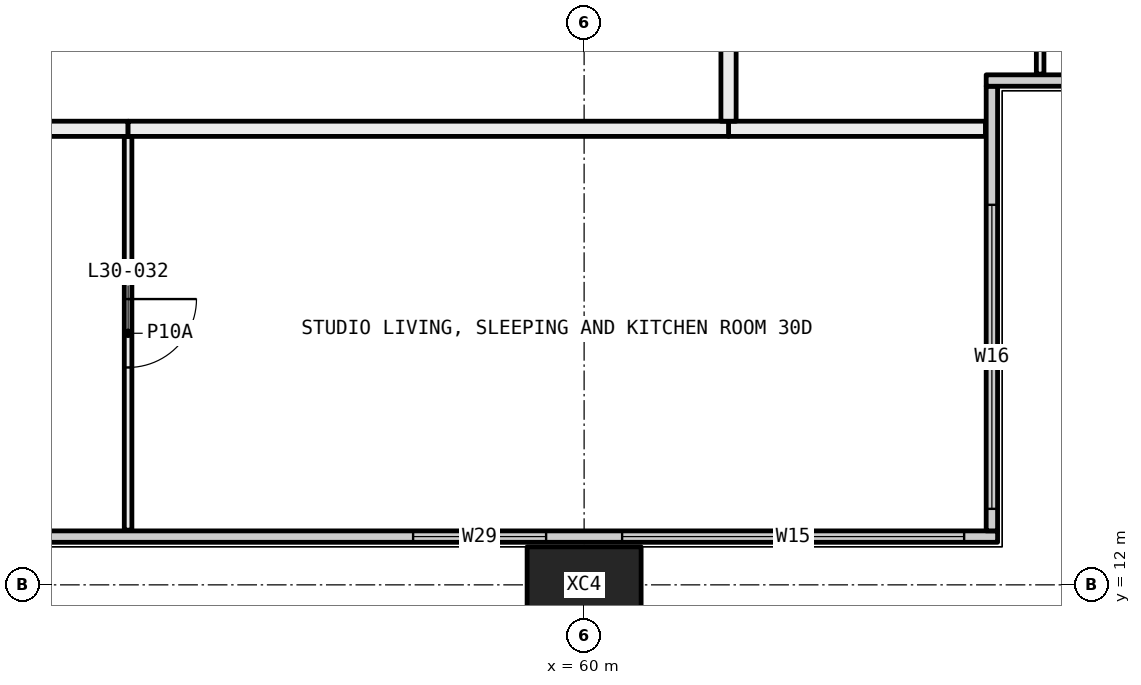
"""IFC4 building model, lengths in metres.
Left out: names, types, materials, properties, quantities, classifications, styles, units other than length and angle.
Written with IfcOpenShell. Run it as: python <this file> out.ifc"""

import sys

from ifc_helpers import new_model, si_unit, direction, frame, frame_2d, origin, origin_2d, place, context, subcontext, project, spatial, rectangle, hollow_rectangle, extrude, element, fill, save


model = new_model("IFC4")
c1 = context("Model", 3, precision=1e-05, world=origin(), true_north=direction((0.0, 1.0)))
c2 = subcontext(c1, "Body", "Model", "MODEL_VIEW")
j1 = project(units=[si_unit("LENGTHUNIT", "METRE"), si_unit("PLANEANGLEUNIT", "RADIAN")], contexts=[c1])
p1 = place(None, origin())
s1 = spatial("IfcSite", under=j1, at=p1, CompositionType="ELEMENT")
p2 = place(p1, origin())
s2 = spatial("IfcBuilding", under=s1, at=p2, CompositionType="ELEMENT")
p3 = place(p2, frame((0.0, 0.0, 117.3)))
s3 = spatial("IfcBuildingStorey", under=s2, at=p3, CompositionType="ELEMENT", Elevation=117.3)
p4 = place(p3, frame((60.0, 12.0, -0.4), z_axis=(0.0, 0.0, 1.0), x_axis=(1.0, 0.0, 0.0)))
e1 = element("IfcColumn", 1, at=p4, inside=s3, PredefinedType="COLUMN", context=c2, shape_type="SweptSolid", body=[
    extrude(hollow_rectangle(XDim=1.5, YDim=1.0, WallThickness=0.06, at=origin_2d()), origin(), (0.0, 0.0, 1.0), 3.45),
])
p5 = place(p3, frame((6.56, 12.635, 0.0), z_axis=(0.0, 0.0, 1.0), x_axis=(1.0, 0.0, 0.0)))
e2 = element("IfcWall", 2, at=p5, inside=s3, PredefinedType="ELEMENTEDWALL", context=c2, shape_type="SweptSolid", body=[
    extrude(rectangle(XDim=58.88, YDim=0.15, at=frame_2d((29.44, 0.0))), origin(), (0.0, 0.0, 1.0), 3.05),
])
p6 = place(p5, frame((0.44, 0.0, 0.45)))
e3 = element("IfcOpeningElement", 3, at=p6, cuts=e2, PredefinedType="OPENING", context=c2, shape_type="SweptSolid", body=[
    extrude(rectangle(XDim=4.5, YDim=2.55, at=frame_2d((2.25, 1.275))), frame((0.0, 0.085, 0.0), z_axis=(0.0, -1.0, 0.0), x_axis=(1.0, 0.0, 0.0)), (0.0, 0.0, 1.0), 0.17),
])
p7 = place(p5, frame((5.94, 0.0, 0.45)))
e4 = element("IfcOpeningElement", 4, at=p7, cuts=e2, PredefinedType="OPENING", context=c2, shape_type="SweptSolid", body=[
    extrude(rectangle(XDim=1.75, YDim=2.55, at=frame_2d((0.875, 1.275))), frame((0.0, 0.085, 0.0), z_axis=(0.0, -1.0, 0.0), x_axis=(1.0, 0.0, 0.0)), (0.0, 0.0, 1.0), 0.17),
])
p8 = place(p5, frame((15.19, 0.0, 0.45)))
e5 = element("IfcOpeningElement", 5, at=p8, cuts=e2, PredefinedType="OPENING", context=c2, shape_type="SweptSolid", body=[
    extrude(rectangle(XDim=1.75, YDim=2.55, at=frame_2d((0.875, 1.275))), frame((0.0, 0.085, 0.0), z_axis=(0.0, -1.0, 0.0), x_axis=(1.0, 0.0, 0.0)), (0.0, 0.0, 1.0), 0.17),
])
p9 = place(p5, frame((17.94, 0.0, 0.45)))
e6 = element("IfcOpeningElement", 6, at=p9, cuts=e2, PredefinedType="OPENING", context=c2, shape_type="SweptSolid", body=[
    extrude(rectangle(XDim=1.75, YDim=2.55, at=frame_2d((0.875, 1.275))), frame((0.0, 0.085, 0.0), z_axis=(0.0, -1.0, 0.0), x_axis=(1.0, 0.0, 0.0)), (0.0, 0.0, 1.0), 0.17),
])
p10 = place(p5, frame((27.19, 0.0, 0.45)))
e7 = element("IfcOpeningElement", 7, at=p10, cuts=e2, PredefinedType="OPENING", context=c2, shape_type="SweptSolid", body=[
    extrude(rectangle(XDim=1.75, YDim=2.55, at=frame_2d((0.875, 1.275))), frame((0.0, 0.085, 0.0), z_axis=(0.0, -1.0, 0.0), x_axis=(1.0, 0.0, 0.0)), (0.0, 0.0, 1.0), 0.17),
])
p11 = place(p5, frame((29.94, 0.0, 0.45)))
e8 = element("IfcOpeningElement", 8, at=p11, cuts=e2, PredefinedType="OPENING", context=c2, shape_type="SweptSolid", body=[
    extrude(rectangle(XDim=1.75, YDim=2.55, at=frame_2d((0.875, 1.275))), frame((0.0, 0.085, 0.0), z_axis=(0.0, -1.0, 0.0), x_axis=(1.0, 0.0, 0.0)), (0.0, 0.0, 1.0), 0.17),
])
p12 = place(p5, frame((39.19, 0.0, 0.45)))
e9 = element("IfcOpeningElement", 9, at=p12, cuts=e2, PredefinedType="OPENING", context=c2, shape_type="SweptSolid", body=[
    extrude(rectangle(XDim=1.75, YDim=2.55, at=frame_2d((0.875, 1.275))), frame((0.0, 0.085, 0.0), z_axis=(0.0, -1.0, 0.0), x_axis=(1.0, 0.0, 0.0)), (0.0, 0.0, 1.0), 0.17),
])
p13 = place(p5, frame((41.94, 0.0, 0.45)))
e10 = element("IfcOpeningElement", 10, at=p13, cuts=e2, PredefinedType="OPENING", context=c2, shape_type="SweptSolid", body=[
    extrude(rectangle(XDim=1.75, YDim=2.55, at=frame_2d((0.875, 1.275))), frame((0.0, 0.085, 0.0), z_axis=(0.0, -1.0, 0.0), x_axis=(1.0, 0.0, 0.0)), (0.0, 0.0, 1.0), 0.17),
])
p14 = place(p5, frame((51.19, 0.0, 0.45)))
e11 = element("IfcOpeningElement", 11, at=p14, cuts=e2, PredefinedType="OPENING", context=c2, shape_type="SweptSolid", body=[
    extrude(rectangle(XDim=1.75, YDim=2.55, at=frame_2d((0.875, 1.275))), frame((0.0, 0.085, 0.0), z_axis=(0.0, -1.0, 0.0), x_axis=(1.0, 0.0, 0.0)), (0.0, 0.0, 1.0), 0.17),
])
p15 = place(p5, frame((53.94, 0.0, 0.45)))
e12 = element("IfcOpeningElement", 12, at=p15, cuts=e2, PredefinedType="OPENING", context=c2, shape_type="SweptSolid", body=[
    extrude(rectangle(XDim=4.5, YDim=2.55, at=frame_2d((2.25, 1.275))), frame((0.0, 0.085, 0.0), z_axis=(0.0, -1.0, 0.0), x_axis=(1.0, 0.0, 0.0)), (0.0, 0.0, 1.0), 0.17),
])
p16 = place(p3, frame((65.365, 12.71, 0.0), z_axis=(0.0, 0.0, 1.0), x_axis=(0.0, 1.0, 0.0)))
e13 = element("IfcWall", 13, at=p16, inside=s3, PredefinedType="ELEMENTEDWALL", context=c2, shape_type="SweptSolid", body=[
    extrude(rectangle(XDim=5.85, YDim=0.15, at=frame_2d((2.925, 0.0))), origin(), (0.0, 0.0, 1.0), 3.05),
])
p17 = place(p16, frame((0.29, 0.0, 0.45)))
e14 = element("IfcOpeningElement", 14, at=p17, cuts=e13, PredefinedType="OPENING", context=c2, shape_type="SweptSolid", body=[
    extrude(rectangle(XDim=4.0, YDim=2.55, at=frame_2d((2.0, 1.275))), frame((0.0, 0.085, 0.0), z_axis=(0.0, -1.0, 0.0), x_axis=(1.0, 0.0, 0.0)), (0.0, 0.0, 1.0), 0.17),
])
p18 = place(p3, frame((65.29, 18.635, 0.0), z_axis=(0.0, 0.0, 1.0), x_axis=(1.0, 0.0, 0.0)))
e15 = element("IfcWall", 15, at=p18, inside=s3, PredefinedType="ELEMENTEDWALL", context=c2, shape_type="SweptSolid", body=[
    extrude(rectangle(XDim=6.15, YDim=0.15, at=frame_2d((3.075, 0.0))), origin(), (0.0, 0.0, 1.0), 3.05),
])
p19 = place(p18, frame((1.71, 0.0, 0.45)))
e16 = element("IfcOpeningElement", 16, at=p19, cuts=e15, PredefinedType="OPENING", context=c2, shape_type="SweptSolid", body=[
    extrude(rectangle(XDim=4.0, YDim=2.55, at=frame_2d((2.0, 1.275))), frame((0.0, 0.085, 0.0), z_axis=(0.0, -1.0, 0.0), x_axis=(1.0, 0.0, 0.0)), (0.0, 0.0, 1.0), 0.17),
])
p20 = place(p3, frame((54.0, 12.72, 0.0), z_axis=(0.0, 0.0, 1.0), x_axis=(0.0, 1.0, 0.0)))
e17 = element("IfcWall", 17, at=p20, inside=s3, PredefinedType="PARTITIONING", context=c2, shape_type="SweptSolid", body=[
    extrude(rectangle(XDim=5.18, YDim=0.1, at=frame_2d((2.59, 0.0))), origin(), (0.0, 0.0, 1.0), 3.05),
])
p21 = place(p20, frame((2.14, 0.0, 0.0)))
e18 = element("IfcOpeningElement", 18, at=p21, cuts=e17, PredefinedType="OPENING", context=c2, shape_type="SweptSolid", body=[
    extrude(rectangle(XDim=0.9, YDim=2.1, at=frame_2d((0.45, 1.05))), frame((0.0, 0.06, 0.0), z_axis=(0.0, -1.0, 0.0), x_axis=(1.0, 0.0, 0.0)), (0.0, 0.0, 1.0), 0.12),
])
p22 = place(p3, frame((54.0, 18.0, 0.0), z_axis=(0.0, 0.0, 1.0), x_axis=(-1.0, 0.0, 0.0)))
e19 = element("IfcWall", 19, at=p22, inside=s3, PredefinedType="PARTITIONING", context=c2, shape_type="SweptSolid", body=[
    extrude(rectangle(XDim=6.0, YDim=0.2, at=frame_2d((3.0, 0.0))), origin(), (0.0, 0.0, 1.0), 3.05),
])
p23 = place(p22, frame((2.5, 0.0, 0.0)))
e20 = element("IfcOpeningElement", 20, at=p23, cuts=e19, PredefinedType="OPENING", context=c2, shape_type="SweptSolid", body=[
    extrude(rectangle(XDim=1.0, YDim=2.1, at=frame_2d((0.5, 1.05))), frame((0.0, 0.11, 0.0), z_axis=(0.0, -1.0, 0.0), x_axis=(1.0, 0.0, 0.0)), (0.0, 0.0, 1.0), 0.22),
])
p24 = place(p3, frame((65.28, 18.0, 0.0), z_axis=(0.0, 0.0, 1.0), x_axis=(-1.0, 0.0, 0.0)))
e21 = element("IfcWall", 21, at=p24, inside=s3, PredefinedType="PARTITIONING", context=c2, shape_type="SweptSolid", body=[
    extrude(rectangle(XDim=3.38, YDim=0.2, at=frame_2d((1.69, 0.0))), origin(), (0.0, 0.0, 1.0), 3.05),
])
p25 = place(p3, frame((61.9, 18.0, 0.0), z_axis=(0.0, 0.0, 1.0), x_axis=(-1.0, 0.0, 0.0)))
e22 = element("IfcWall", 22, at=p25, inside=s3, PredefinedType="PARTITIONING", context=c2, shape_type="SweptSolid", body=[
    extrude(rectangle(XDim=7.9, YDim=0.2, at=frame_2d((3.95, 0.0))), origin(), (0.0, 0.0, 1.0), 3.05),
])
p26 = place(p3, frame((66.0, 22.5, 0.0), z_axis=(0.0, 0.0, 1.0), x_axis=(0.0, -1.0, 0.0)))
e23 = element("IfcWall", 23, at=p26, inside=s3, PredefinedType="PARTITIONING", context=c2, shape_type="SweptSolid", body=[
    extrude(rectangle(XDim=3.78, YDim=0.1, at=frame_2d((1.89, 0.0))), origin(), (0.0, 0.0, 1.0), 3.05),
])
p27 = place(p3, frame((61.9, 22.5, 0.0), z_axis=(0.0, 0.0, 1.0), x_axis=(0.0, -1.0, 0.0)))
e24 = element("IfcWall", 24, at=p27, inside=s3, PredefinedType="PARTITIONING", context=c2, shape_type="SweptSolid", body=[
    extrude(rectangle(XDim=4.4, YDim=0.2, at=frame_2d((2.2, 0.0))), origin(), (0.0, 0.0, 1.0), 3.05),
])
p28 = place(p14, origin())
e25 = element("IfcWindow", 25, at=p28, inside=s3, PartitioningType="SINGLE_PANEL", PredefinedType="WINDOW", context=c2, shape_type="SweptSolid", body=[
    extrude(rectangle(XDim=1.75, YDim=2.55, at=frame_2d((0.875, 1.275))), frame((0.0, 0.03, 0.0), z_axis=(0.0, -1.0, 0.0), x_axis=(1.0, 0.0, 0.0)), (0.0, 0.0, 1.0), 0.06),
])
fill(e11, e25)
p29 = place(p15, origin())
e26 = element("IfcWindow", 26, at=p29, inside=s3, PartitioningType="SINGLE_PANEL", PredefinedType="WINDOW", context=c2, shape_type="SweptSolid", body=[
    extrude(rectangle(XDim=4.5, YDim=2.55, at=frame_2d((2.25, 1.275))), frame((0.0, 0.03, 0.0), z_axis=(0.0, -1.0, 0.0), x_axis=(1.0, 0.0, 0.0)), (0.0, 0.0, 1.0), 0.06),
])
fill(e12, e26)
p30 = place(p17, origin())
e27 = element("IfcWindow", 27, at=p30, inside=s3, PartitioningType="SINGLE_PANEL", PredefinedType="WINDOW", context=c2, shape_type="SweptSolid", body=[
    extrude(rectangle(XDim=4.0, YDim=2.55, at=frame_2d((2.0, 1.275))), frame((0.0, 0.03, 0.0), z_axis=(0.0, -1.0, 0.0), x_axis=(1.0, 0.0, 0.0)), (0.0, 0.0, 1.0), 0.06),
])
fill(e14, e27)
p31 = place(p21, frame((0.9, 0.0, 0.0), x_axis=(-1.0, 0.0, 0.0)))
e28 = element("IfcDoor", 28, at=p31, inside=s3, OperationType="SINGLE_SWING_RIGHT", PredefinedType="DOOR", context=c2, shape_type="SweptSolid", body=[
    extrude(rectangle(XDim=0.9, YDim=2.1, at=frame_2d((0.45, 1.05))), frame((0.0, 0.025, 0.0), z_axis=(0.0, -1.0, 0.0), x_axis=(1.0, 0.0, 0.0)), (0.0, 0.0, 1.0), 0.05),
])
fill(e18, e28)
save(model, sys.argv[1])
